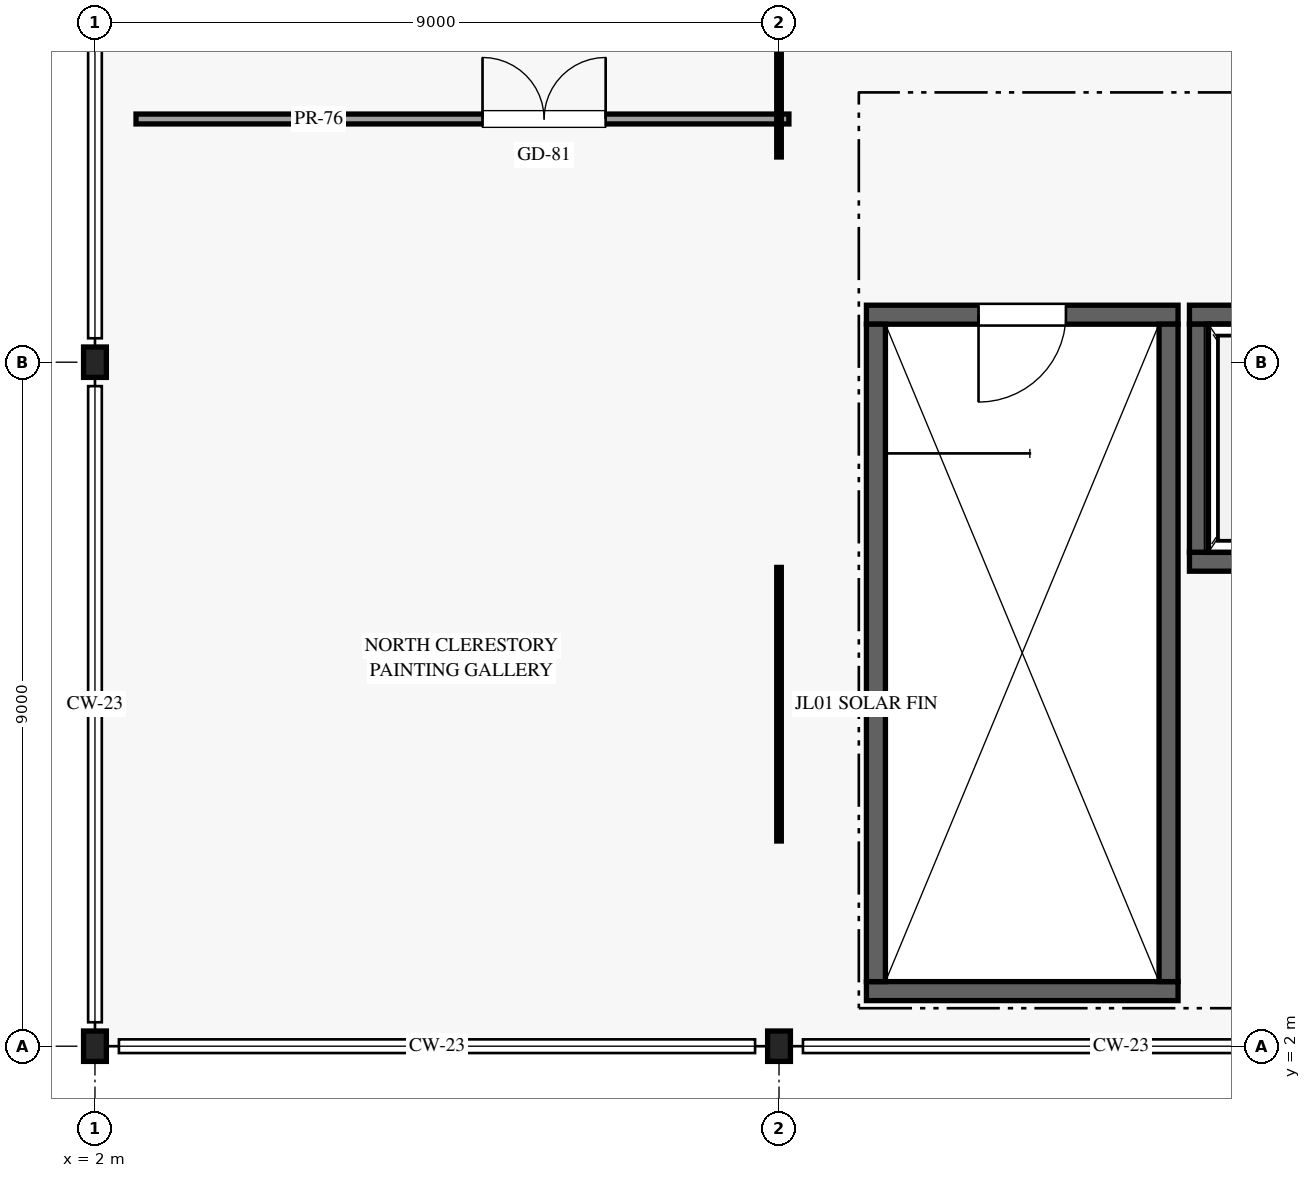
"""IFC4 building model, lengths in metres.
Left out: names, types, materials, properties, quantities, classifications, styles, units other than length and angle.
Written with IfcOpenShell. Run it as: python <this file> out.ifc"""

import sys

from ifc_helpers import new_model, si_unit, direction, frame, frame_2d, origin, origin_2d, place, context, subcontext, project, spatial, rectangle, i_section, extrude, element, fill, save


model = new_model("IFC4")
c1 = context("Model", 3, precision=1e-05, world=origin(), true_north=direction((0.0, 1.0)))
c2 = subcontext(c1, "Body", "Model", "MODEL_VIEW")
j1 = project(units=[si_unit("LENGTHUNIT", "METRE"), si_unit("PLANEANGLEUNIT", "RADIAN")], contexts=[c1])
p1 = place(None, origin())
s1 = spatial("IfcSite", under=j1, at=p1, CompositionType="ELEMENT")
p2 = place(p1, origin())
s2 = spatial("IfcBuilding", under=s1, at=p2, CompositionType="ELEMENT")
p3 = place(p2, frame((0.0, 0.0, 24.0)))
s3 = spatial("IfcBuildingStorey", under=s2, at=p3, CompositionType="ELEMENT", Elevation=24.0)
for number, where, z_axis, x_axis in (
    (1, (2.0, 2.0, 0.0), (0.0, 0.0, 1.0), (1.0, 0.0, 0.0)),
    (2, (2.0, 11.0, 0.0), (0.0, 0.0, 1.0), (1.0, 0.0, 0.0)),
    (3, (11.0, 2.0, 0.0), (0.0, 0.0, 1.0), (1.0, 0.0, 0.0)),
):
    element("IfcColumn", number, at=place(p3, frame(where, z_axis=z_axis, x_axis=x_axis)), inside=s3, PredefinedType="COLUMN", context=c2, shape_type="SweptSolid", body=[
        extrude(i_section(OverallWidth=0.3, OverallDepth=0.4, WebThickness=0.013, FlangeThickness=0.024, FilletRadius=0.027, at=origin_2d()), origin(), (0.0, 0.0, 1.0), 4.8),
    ])
p4 = place(p3, frame((12.15, 11.625, 0.0), z_axis=(0.0, 0.0, 1.0), x_axis=(1.0, 0.0, 0.0)))
e4 = element("IfcWall", 4, at=p4, inside=s3, PredefinedType="SHEAR", context=c2, shape_type="SweptSolid", body=[
    extrude(rectangle(XDim=4.1, YDim=0.25, at=frame_2d((2.05, 0.0))), origin(), (0.0, 0.0, 1.0), 4.48),
])
p5 = place(p4, frame((2.625, 0.0, 0.0), z_axis=(0.0, 0.0, 1.0), x_axis=(-1.0, 0.0, 0.0)))
e5 = element("IfcOpeningElement", 5, at=p5, cuts=e4, PredefinedType="OPENING", context=c2, shape_type="SweptSolid", body=[
    extrude(rectangle(XDim=1.15, YDim=2.2, at=frame_2d((0.575, 1.1))), frame((0.0, 0.135, 0.0), z_axis=(0.0, -1.0, 0.0), x_axis=(1.0, 0.0, 0.0)), (0.0, 0.0, 1.0), 0.27),
])
p6 = place(p3, frame((12.15, 2.725, 0.0), z_axis=(0.0, 0.0, 1.0), x_axis=(1.0, 0.0, 0.0)))
e6 = element("IfcWall", 6, at=p6, inside=s3, PredefinedType="SHEAR", context=c2, shape_type="SweptSolid", body=[
    extrude(rectangle(XDim=4.1, YDim=0.25, at=frame_2d((2.05, 0.0))), origin(), (0.0, 0.0, 1.0), 4.48),
])
for number, where, z_axis, x_axis in (
    (7, (12.275, 2.85, 0.0), (0.0, 0.0, 1.0), (0.0, 1.0, 0.0)),
    (8, (16.125, 2.85, 0.0), (0.0, 0.0, 1.0), (0.0, 1.0, 0.0)),
):
    element("IfcWall", number, at=place(p3, frame(where, z_axis=z_axis, x_axis=x_axis)), inside=s3, PredefinedType="SHEAR", context=c2, shape_type="SweptSolid", body=[
        extrude(rectangle(XDim=8.65, YDim=0.25, at=frame_2d((4.325, 0.0))), origin(), (0.0, 0.0, 1.0), 4.48),
    ])
p7 = place(p3, frame((16.4, 11.625, 0.0), z_axis=(0.0, 0.0, 1.0), x_axis=(1.0, 0.0, 0.0)))
e9 = element("IfcWall", 9, at=p7, inside=s3, PredefinedType="SHEAR", context=c2, shape_type="SweptSolid", body=[
    extrude(rectangle(XDim=2.5, YDim=0.25, at=frame_2d((1.25, 0.0))), origin(), (0.0, 0.0, 1.0), 4.48),
])
p8 = place(p7, frame((0.7, 0.0, 0.0)))
e10 = element("IfcOpeningElement", 10, at=p8, cuts=e9, PredefinedType="OPENING", context=c2, shape_type="SweptSolid", body=[
    extrude(rectangle(XDim=1.1, YDim=2.2, at=frame_2d((0.55, 1.1))), frame((0.0, 0.135, 0.0), z_axis=(0.0, -1.0, 0.0), x_axis=(1.0, 0.0, 0.0)), (0.0, 0.0, 1.0), 0.27),
])
p9 = place(p3, frame((16.4, 8.375, 0.0), z_axis=(0.0, 0.0, 1.0), x_axis=(1.0, 0.0, 0.0)))
e11 = element("IfcWall", 11, at=p9, inside=s3, PredefinedType="SHEAR", context=c2, shape_type="SweptSolid", body=[
    extrude(rectangle(XDim=2.5, YDim=0.25, at=frame_2d((1.25, 0.0))), origin(), (0.0, 0.0, 1.0), 4.48),
])
p10 = place(p3, frame((16.525, 8.5, 0.0), z_axis=(0.0, 0.0, 1.0), x_axis=(0.0, 1.0, 0.0)))
e12 = element("IfcWall", 12, at=p10, inside=s3, PredefinedType="SHEAR", context=c2, shape_type="SweptSolid", body=[
    extrude(rectangle(XDim=3.0, YDim=0.25, at=frame_2d((1.5, 0.0))), origin(), (0.0, 0.0, 1.0), 4.48),
])
p11 = place(p3, frame((2.54, 14.2, 0.0), z_axis=(0.0, 0.0, 1.0), x_axis=(1.0, 0.0, 0.0)))
e13 = element("IfcWall", 13, at=p11, inside=s3, PredefinedType="PARTITIONING", context=c2, shape_type="SweptSolid", body=[
    extrude(rectangle(XDim=8.59, YDim=0.13, at=frame_2d((4.295, 0.0))), origin(), (0.0, 0.0, 1.0), 4.48),
])
p12 = place(p11, frame((4.559, 0.0, 0.0)))
e14 = element("IfcOpeningElement", 14, at=p12, cuts=e13, PredefinedType="OPENING", context=c2, shape_type="SweptSolid", body=[
    extrude(rectangle(XDim=1.62, YDim=2.4, at=frame_2d((0.81, 1.2))), frame((0.0, 0.075, 0.0), z_axis=(0.0, -1.0, 0.0), x_axis=(1.0, 0.0, 0.0)), (0.0, 0.0, 1.0), 0.15),
])
p13 = place(p5, origin())
e15 = element("IfcDoor", 15, at=p13, inside=s3, OperationType="SINGLE_SWING_RIGHT", PredefinedType="DOOR", context=c2, shape_type="SweptSolid", body=[
    extrude(rectangle(XDim=1.15, YDim=2.2, at=frame_2d((0.575, 1.1))), frame((0.0, 0.025, 0.0), z_axis=(0.0, -1.0, 0.0), x_axis=(1.0, 0.0, 0.0)), (0.0, 0.0, 1.0), 0.05),
])
fill(e5, e15)
p14 = place(p12, origin())
e16 = element("IfcDoor", 16, at=p14, inside=s3, OperationType="DOUBLE_DOOR_SINGLE_SWING", PredefinedType="DOOR", context=c2, shape_type="SweptSolid", body=[
    extrude(rectangle(XDim=1.62, YDim=2.4, at=frame_2d((0.81, 1.2))), frame((0.0, 0.025, 0.0), z_axis=(0.0, -1.0, 0.0), x_axis=(1.0, 0.0, 0.0)), (0.0, 0.0, 1.0), 0.05),
])
fill(e14, e16)
save(model, sys.argv[1])
